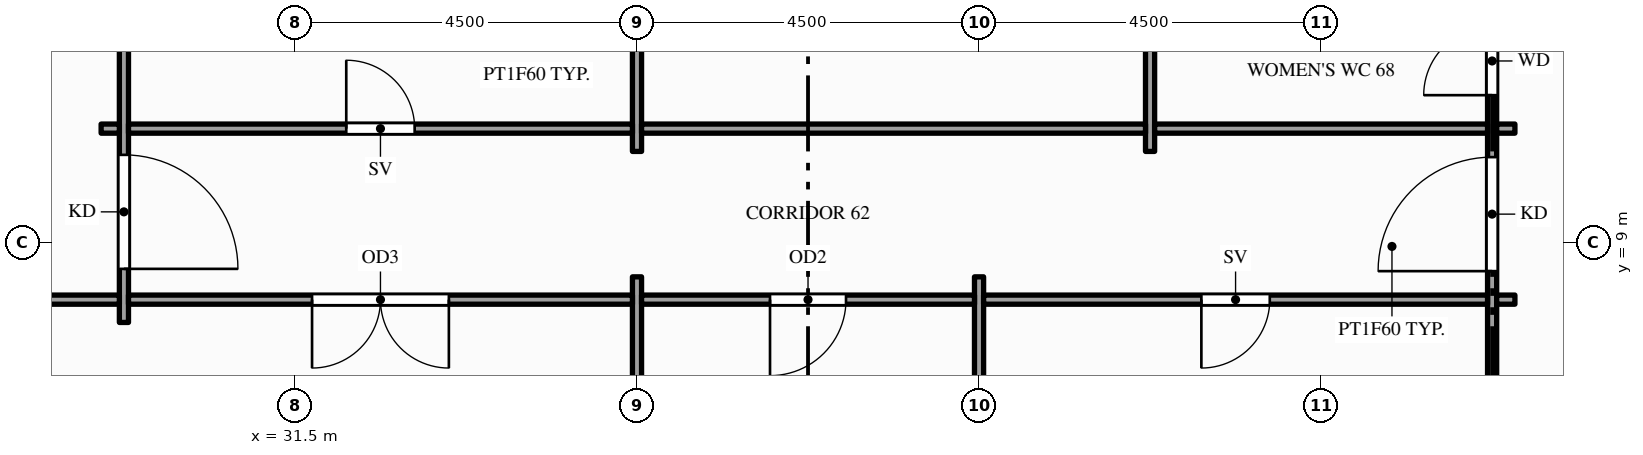
"""IFC4 building model, lengths in metres.
Left out: names, types, materials, properties, quantities, classifications, styles, units other than length and angle.
Written with IfcOpenShell. Run it as: python <this file> out.ifc"""

import sys

from ifc_helpers import new_model, si_unit, direction, frame, frame_2d, origin, place, context, subcontext, project, spatial, rectangle, extrude, element, fill, save


model = new_model("IFC4")
c1 = context("Model", 3, precision=1e-05, world=origin(), true_north=direction((0.0, 1.0)))
c2 = subcontext(c1, "Body", "Model", "MODEL_VIEW")
j1 = project(units=[si_unit("LENGTHUNIT", "METRE"), si_unit("PLANEANGLEUNIT", "RADIAN")], contexts=[c1])
p1 = place(None, origin())
s1 = spatial("IfcSite", under=j1, at=p1, CompositionType="ELEMENT")
p2 = place(p1, origin())
s2 = spatial("IfcBuilding", under=s1, at=p2, CompositionType="ELEMENT")
p3 = place(p2, frame((0.0, 0.0, 171.0)))
s3 = spatial("IfcBuildingStorey", under=s2, at=p3, CompositionType="ELEMENT", Elevation=171.0)
p4 = place(p3, frame((29.25, 7.95, 0.0), z_axis=(0.0, 0.0, 1.0), x_axis=(0.0, 1.0, 0.0)))
e1 = element("IfcWall", 1, at=p4, inside=s3, PredefinedType="PARTITIONING", context=c2, shape_type="SweptSolid", body=[
    extrude(rectangle(XDim=9.6, YDim=0.12, at=frame_2d((4.8, 0.0))), origin(), (0.0, 0.0, 1.0), 2.87),
])
p5 = place(p4, frame((0.705, 0.0, 0.0)))
e2 = element("IfcOpeningElement", 2, at=p5, cuts=e1, PredefinedType="OPENING", context=c2, shape_type="SweptSolid", body=[
    extrude(rectangle(XDim=1.5, YDim=2.1, at=frame_2d((0.75, 1.05))), frame((0.0, 0.07, 0.0), z_axis=(0.0, -1.0, 0.0), x_axis=(1.0, 0.0, 0.0)), (0.0, 0.0, 1.0), 0.14),
])
p6 = place(p4, frame((7.395, 0.0, 0.0)))
e3 = element("IfcOpeningElement", 3, at=p6, cuts=e1, PredefinedType="OPENING", context=c2, shape_type="SweptSolid", body=[
    extrude(rectangle(XDim=1.5, YDim=2.1, at=frame_2d((0.75, 1.05))), frame((0.0, 0.07, 0.0), z_axis=(0.0, -1.0, 0.0), x_axis=(1.0, 0.0, 0.0)), (0.0, 0.0, 1.0), 0.14),
])
p7 = place(p3, frame((36.0, 1.65, 0.0), z_axis=(0.0, 0.0, 1.0), x_axis=(0.0, 1.0, 0.0)))
e4 = element("IfcWall", 4, at=p7, inside=s3, PredefinedType="PARTITIONING", context=c2, shape_type="SweptSolid", body=[
    extrude(rectangle(XDim=6.9, YDim=0.12, at=frame_2d((3.45, 0.0))), origin(), (0.0, 0.0, 1.0), 2.87),
])
p8 = place(p3, frame((36.0, 10.2, 0.0), z_axis=(0.0, 0.0, 1.0), x_axis=(0.0, 1.0, 0.0)))
e5 = element("IfcWall", 5, at=p8, inside=s3, PredefinedType="PARTITIONING", context=c2, shape_type="SweptSolid", body=[
    extrude(rectangle(XDim=5.1, YDim=0.12, at=frame_2d((2.55, 0.0))), origin(), (0.0, 0.0, 1.0), 2.87),
])
p9 = place(p3, frame((40.5, 1.65, 0.0), z_axis=(0.0, 0.0, 1.0), x_axis=(0.0, 1.0, 0.0)))
e6 = element("IfcWall", 6, at=p9, inside=s3, PredefinedType="PARTITIONING", context=c2, shape_type="SweptSolid", body=[
    extrude(rectangle(XDim=6.9, YDim=0.12, at=frame_2d((3.45, 0.0))), origin(), (0.0, 0.0, 1.0), 2.87),
])
p10 = place(p3, frame((42.75, 10.2, 0.0), z_axis=(0.0, 0.0, 1.0), x_axis=(0.0, 1.0, 0.0)))
e7 = element("IfcWall", 7, at=p10, inside=s3, PredefinedType="PARTITIONING", context=c2, shape_type="SweptSolid", body=[
    extrude(rectangle(XDim=5.1, YDim=0.12, at=frame_2d((2.55, 0.0))), origin(), (0.0, 0.0, 1.0), 2.87),
])
p11 = place(p3, frame((47.25, 1.65, 0.0), z_axis=(0.0, 0.0, 1.0), x_axis=(0.0, 1.0, 0.0)))
e8 = element("IfcWall", 8, at=p11, inside=s3, PredefinedType="PARTITIONING", context=c2, shape_type="SweptSolid", body=[
    extrude(rectangle(XDim=22.2, YDim=0.12, at=frame_2d((11.1, 0.0))), origin(), (0.0, 0.0, 1.0), 2.87),
])
p12 = place(p11, frame((6.975, 0.0, 0.0)))
e9 = element("IfcOpeningElement", 9, at=p12, cuts=e8, PredefinedType="OPENING", context=c2, shape_type="SweptSolid", body=[
    extrude(rectangle(XDim=1.5, YDim=2.1, at=frame_2d((0.75, 1.05))), frame((0.0, 0.07, 0.0), z_axis=(0.0, -1.0, 0.0), x_axis=(1.0, 0.0, 0.0)), (0.0, 0.0, 1.0), 0.14),
])
p13 = place(p11, frame((13.725, 0.0, 0.0)))
e10 = element("IfcOpeningElement", 10, at=p13, cuts=e8, PredefinedType="OPENING", context=c2, shape_type="SweptSolid", body=[
    extrude(rectangle(XDim=1.5, YDim=2.1, at=frame_2d((0.75, 1.05))), frame((0.0, 0.07, 0.0), z_axis=(0.0, -1.0, 0.0), x_axis=(1.0, 0.0, 0.0)), (0.0, 0.0, 1.0), 0.14),
])
p14 = place(p11, frame((9.29, 0.0, 0.0)))
e11 = element("IfcOpeningElement", 11, at=p14, cuts=e8, PredefinedType="OPENING", context=c2, shape_type="SweptSolid", body=[
    extrude(rectangle(XDim=0.9, YDim=2.1, at=frame_2d((0.45, 1.05))), frame((0.0, 0.07, 0.0), z_axis=(0.0, -1.0, 0.0), x_axis=(1.0, 0.0, 0.0)), (0.0, 0.0, 1.0), 0.14),
])
p15 = place(p11, frame((10.65, 0.0, 0.0)))
e12 = element("IfcOpeningElement", 12, at=p15, cuts=e8, PredefinedType="OPENING", context=c2, shape_type="SweptSolid", body=[
    extrude(rectangle(XDim=0.9, YDim=2.1, at=frame_2d((0.45, 1.05))), frame((0.0, 0.07, 0.0), z_axis=(0.0, -1.0, 0.0), x_axis=(1.0, 0.0, 0.0)), (0.0, 0.0, 1.0), 0.14),
])
p16 = place(p11, frame((12.01, 0.0, 0.0)))
e13 = element("IfcOpeningElement", 13, at=p16, cuts=e8, PredefinedType="OPENING", context=c2, shape_type="SweptSolid", body=[
    extrude(rectangle(XDim=1.0, YDim=2.1, at=frame_2d((0.5, 1.05))), frame((0.0, 0.07, 0.0), z_axis=(0.0, -1.0, 0.0), x_axis=(1.0, 0.0, 0.0)), (0.0, 0.0, 1.0), 0.14),
])
p17 = place(p3, frame((27.06, 8.25, 0.0), z_axis=(0.0, 0.0, 1.0), x_axis=(1.0, 0.0, 0.0)))
e14 = element("IfcWall", 14, at=p17, inside=s3, PredefinedType="PARTITIONING", context=c2, shape_type="SweptSolid", body=[
    extrude(rectangle(XDim=2.13, YDim=0.12, at=frame_2d((1.065, 0.0))), origin(), (0.0, 0.0, 1.0), 2.87),
])
p18 = place(p3, frame((29.31, 8.25, 0.0), z_axis=(0.0, 0.0, 1.0), x_axis=(1.0, 0.0, 0.0)))
e15 = element("IfcWall", 15, at=p18, inside=s3, PredefinedType="PARTITIONING", context=c2, shape_type="SweptSolid", body=[
    extrude(rectangle(XDim=6.63, YDim=0.12, at=frame_2d((3.315, 0.0))), origin(), (0.0, 0.0, 1.0), 2.87),
])
p19 = place(p18, frame((2.415, 0.0, 0.0)))
e16 = element("IfcOpeningElement", 16, at=p19, cuts=e15, PredefinedType="OPENING", context=c2, shape_type="SweptSolid", body=[
    extrude(rectangle(XDim=1.8, YDim=2.1, at=frame_2d((0.9, 1.05))), frame((0.0, 0.07, 0.0), z_axis=(0.0, -1.0, 0.0), x_axis=(1.0, 0.0, 0.0)), (0.0, 0.0, 1.0), 0.14),
])
p20 = place(p3, frame((36.06, 8.25, 0.0), z_axis=(0.0, 0.0, 1.0), x_axis=(1.0, 0.0, 0.0)))
e17 = element("IfcWall", 17, at=p20, inside=s3, PredefinedType="PARTITIONING", context=c2, shape_type="SweptSolid", body=[
    extrude(rectangle(XDim=4.38, YDim=0.12, at=frame_2d((2.19, 0.0))), origin(), (0.0, 0.0, 1.0), 2.87),
])
p21 = place(p20, frame((1.69, 0.0, 0.0)))
e18 = element("IfcOpeningElement", 18, at=p21, cuts=e17, PredefinedType="OPENING", context=c2, shape_type="SweptSolid", body=[
    extrude(rectangle(XDim=1.0, YDim=2.1, at=frame_2d((0.5, 1.05))), frame((0.0, 0.07, 0.0), z_axis=(0.0, -1.0, 0.0), x_axis=(1.0, 0.0, 0.0)), (0.0, 0.0, 1.0), 0.14),
])
p22 = place(p3, frame((40.56, 8.25, 0.0), z_axis=(0.0, 0.0, 1.0), x_axis=(1.0, 0.0, 0.0)))
e19 = element("IfcWall", 19, at=p22, inside=s3, PredefinedType="PARTITIONING", context=c2, shape_type="SweptSolid", body=[
    extrude(rectangle(XDim=6.63, YDim=0.12, at=frame_2d((3.315, 0.0))), origin(), (0.0, 0.0, 1.0), 2.87),
])
p23 = place(p22, frame((2.865, 0.0, 0.0)))
e20 = element("IfcOpeningElement", 20, at=p23, cuts=e19, PredefinedType="OPENING", context=c2, shape_type="SweptSolid", body=[
    extrude(rectangle(XDim=0.9, YDim=2.1, at=frame_2d((0.45, 1.05))), frame((0.0, 0.07, 0.0), z_axis=(0.0, -1.0, 0.0), x_axis=(1.0, 0.0, 0.0)), (0.0, 0.0, 1.0), 0.14),
])
for number, where, z_axis, x_axis in (
    (21, (47.31, 8.25, 0.0), (0.0, 0.0, 1.0), (1.0, 0.0, 0.0)),
    (22, (28.95, 10.5, 0.0), (0.0, 0.0, 1.0), (1.0, 0.0, 0.0)),
):
    element("IfcWall", number, at=place(p3, frame(where, z_axis=z_axis, x_axis=x_axis)), inside=s3, PredefinedType="PARTITIONING", context=c2, shape_type="SweptSolid", body=[
        extrude(rectangle(XDim=0.24, YDim=0.12, at=frame_2d((0.12, 0.0))), origin(), (0.0, 0.0, 1.0), 2.87),
    ])
p24 = place(p3, frame((29.31, 10.5, 0.0), z_axis=(0.0, 0.0, 1.0), x_axis=(1.0, 0.0, 0.0)))
e23 = element("IfcWall", 23, at=p24, inside=s3, PredefinedType="PARTITIONING", context=c2, shape_type="SweptSolid", body=[
    extrude(rectangle(XDim=6.63, YDim=0.12, at=frame_2d((3.315, 0.0))), origin(), (0.0, 0.0, 1.0), 2.87),
])
p25 = place(p24, frame((2.865, 0.0, 0.0)))
e24 = element("IfcOpeningElement", 24, at=p25, cuts=e23, PredefinedType="OPENING", context=c2, shape_type="SweptSolid", body=[
    extrude(rectangle(XDim=0.9, YDim=2.1, at=frame_2d((0.45, 1.05))), frame((0.0, 0.07, 0.0), z_axis=(0.0, -1.0, 0.0), x_axis=(1.0, 0.0, 0.0)), (0.0, 0.0, 1.0), 0.14),
])
p26 = place(p3, frame((36.06, 10.5, 0.0), z_axis=(0.0, 0.0, 1.0), x_axis=(1.0, 0.0, 0.0)))
e25 = element("IfcWall", 25, at=p26, inside=s3, PredefinedType="PARTITIONING", context=c2, shape_type="SweptSolid", body=[
    extrude(rectangle(XDim=6.63, YDim=0.12, at=frame_2d((3.315, 0.0))), origin(), (0.0, 0.0, 1.0), 2.87),
])
p27 = place(p3, frame((42.81, 10.5, 0.0), z_axis=(0.0, 0.0, 1.0), x_axis=(1.0, 0.0, 0.0)))
e26 = element("IfcWall", 26, at=p27, inside=s3, PredefinedType="PARTITIONING", context=c2, shape_type="SweptSolid", body=[
    extrude(rectangle(XDim=4.38, YDim=0.12, at=frame_2d((2.19, 0.0))), origin(), (0.0, 0.0, 1.0), 2.87),
])
p28 = place(p3, frame((47.31, 10.5, 0.0), z_axis=(0.0, 0.0, 1.0), x_axis=(1.0, 0.0, 0.0)))
e27 = element("IfcWall", 27, at=p28, inside=s3, PredefinedType="PARTITIONING", context=c2, shape_type="SweptSolid", body=[
    extrude(rectangle(XDim=0.24, YDim=0.12, at=frame_2d((0.12, 0.0))), origin(), (0.0, 0.0, 1.0), 2.87),
])
p29 = place(p5, origin())
e28 = element("IfcDoor", 28, at=p29, inside=s3, OperationType="SINGLE_SWING_LEFT", PredefinedType="DOOR", context=c2, shape_type="SweptSolid", body=[
    extrude(rectangle(XDim=1.5, YDim=2.1, at=frame_2d((0.75, 1.05))), frame((0.0, 0.025, 0.0), z_axis=(0.0, -1.0, 0.0), x_axis=(1.0, 0.0, 0.0)), (0.0, 0.0, 1.0), 0.05),
])
fill(e2, e28)
p30 = place(p12, origin())
e29 = element("IfcDoor", 29, at=p30, inside=s3, OperationType="SINGLE_SWING_LEFT", PredefinedType="DOOR", context=c2, shape_type="SweptSolid", body=[
    extrude(rectangle(XDim=1.5, YDim=2.1, at=frame_2d((0.75, 1.05))), frame((0.0, 0.025, 0.0), z_axis=(0.0, -1.0, 0.0), x_axis=(1.0, 0.0, 0.0)), (0.0, 0.0, 1.0), 0.05),
])
fill(e9, e29)
p31 = place(p25, origin())
e30 = element("IfcDoor", 30, at=p31, inside=s3, OperationType="SINGLE_SWING_LEFT", PredefinedType="DOOR", context=c2, shape_type="SweptSolid", body=[
    extrude(rectangle(XDim=0.9, YDim=2.1, at=frame_2d((0.45, 1.05))), frame((0.0, 0.025, 0.0), z_axis=(0.0, -1.0, 0.0), x_axis=(1.0, 0.0, 0.0)), (0.0, 0.0, 1.0), 0.05),
])
fill(e24, e30)
p32 = place(p14, origin())
e31 = element("IfcDoor", 31, at=p32, inside=s3, OperationType="SINGLE_SWING_LEFT", PredefinedType="DOOR", context=c2, shape_type="SweptSolid", body=[
    extrude(rectangle(XDim=0.9, YDim=2.1, at=frame_2d((0.45, 1.05))), frame((0.0, 0.025, 0.0), z_axis=(0.0, -1.0, 0.0), x_axis=(1.0, 0.0, 0.0)), (0.0, 0.0, 1.0), 0.05),
])
fill(e11, e31)
p33 = place(p19, origin())
e32 = element("IfcDoor", 32, at=p33, inside=s3, OperationType="DOUBLE_DOOR_SINGLE_SWING", PredefinedType="DOOR", context=c2, shape_type="SweptSolid", body=[
    extrude(rectangle(XDim=1.8, YDim=2.1, at=frame_2d((0.9, 1.05))), frame((0.0, 0.025, 0.0), z_axis=(0.0, -1.0, 0.0), x_axis=(1.0, 0.0, 0.0)), (0.0, 0.0, 1.0), 0.05),
])
fill(e16, e32)
p34 = place(p21, origin())
e33 = element("IfcDoor", 33, at=p34, inside=s3, OperationType="SINGLE_SWING_LEFT", PredefinedType="DOOR", context=c2, shape_type="SweptSolid", body=[
    extrude(rectangle(XDim=1.0, YDim=2.1, at=frame_2d((0.5, 1.05))), frame((0.0, 0.025, 0.0), z_axis=(0.0, -1.0, 0.0), x_axis=(1.0, 0.0, 0.0)), (0.0, 0.0, 1.0), 0.05),
])
fill(e18, e33)
p35 = place(p23, origin())
e34 = element("IfcDoor", 34, at=p35, inside=s3, OperationType="SINGLE_SWING_LEFT", PredefinedType="DOOR", context=c2, shape_type="SweptSolid", body=[
    extrude(rectangle(XDim=0.9, YDim=2.1, at=frame_2d((0.45, 1.05))), frame((0.0, 0.025, 0.0), z_axis=(0.0, -1.0, 0.0), x_axis=(1.0, 0.0, 0.0)), (0.0, 0.0, 1.0), 0.05),
])
fill(e20, e34)
save(model, sys.argv[1])
